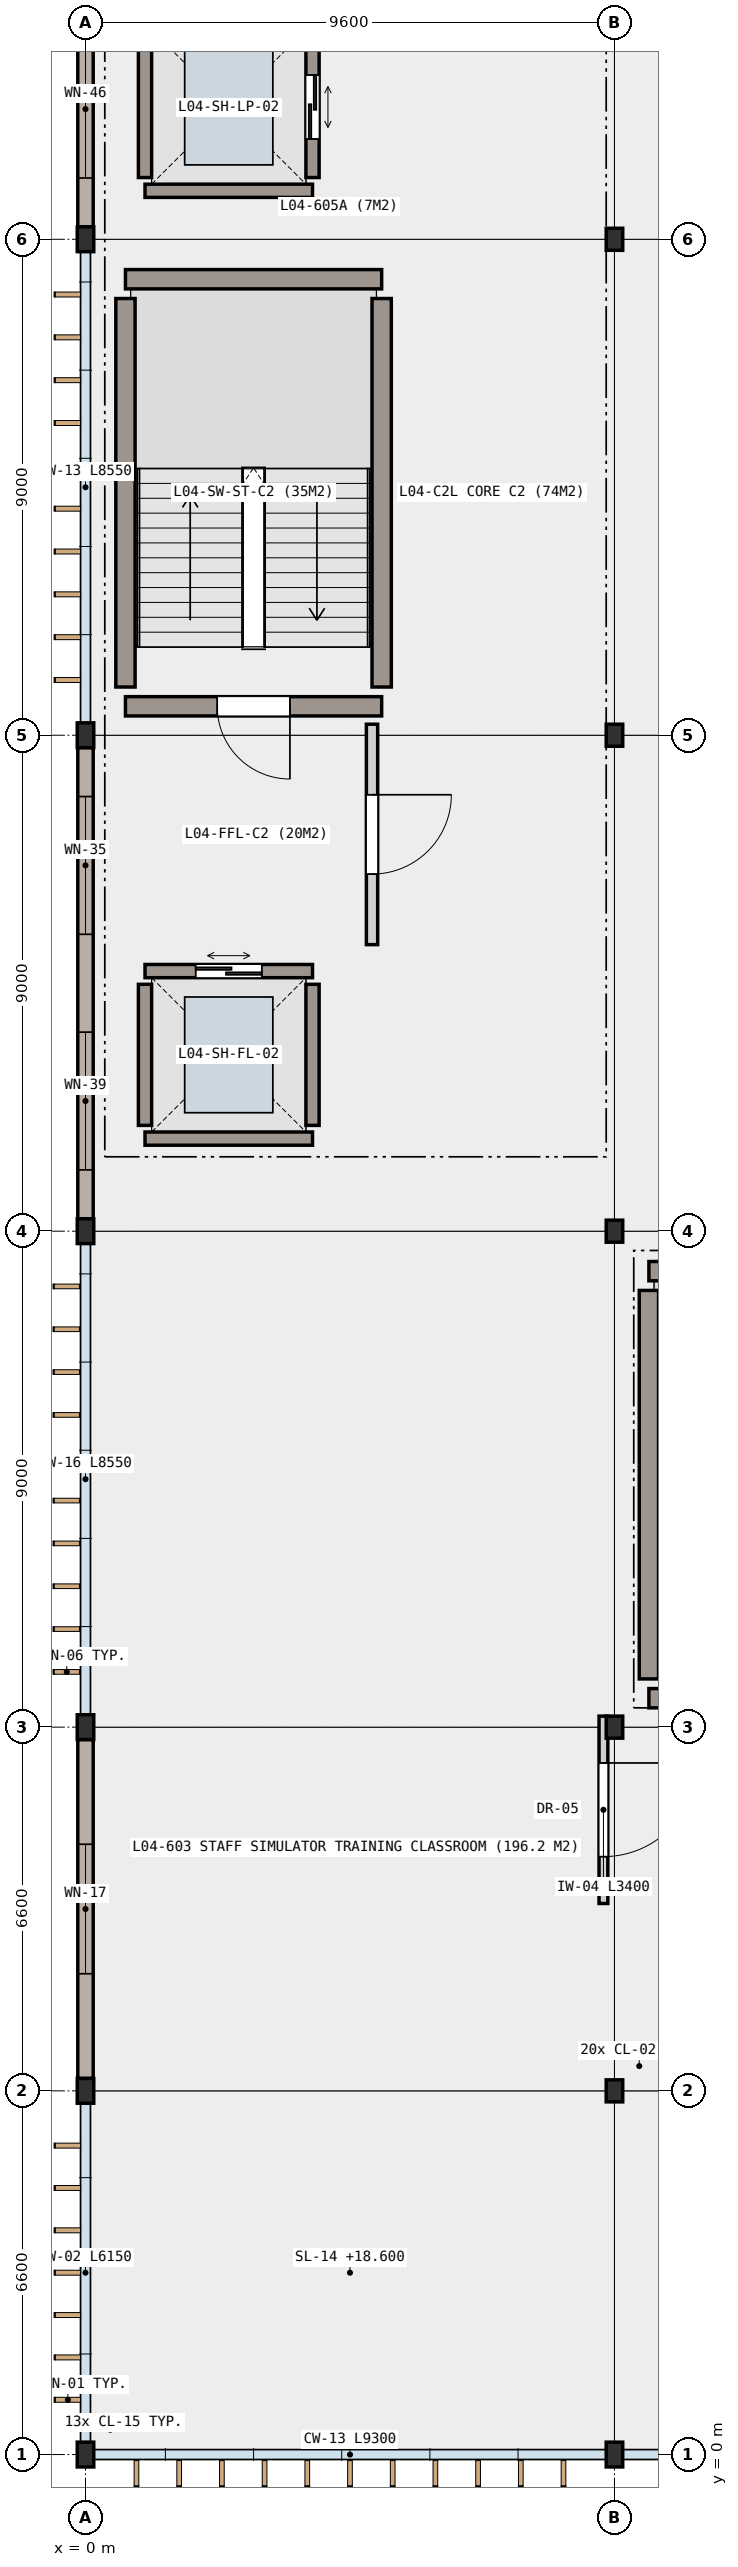
"""IFC4 building model, lengths in metres.
Left out: names, types, materials, properties, quantities, classifications, styles, units other than length and angle.
Written with IfcOpenShell. Run it as: python <this file> out.ifc"""

import sys

from ifc_helpers import new_model, si_unit, direction, frame, frame_2d, origin, origin_2d, place, context, subcontext, project, spatial, rectangle, i_section, extrude, element, fill, save


model = new_model("IFC4")
c1 = context("Model", 3, precision=1e-05, world=origin(), true_north=direction((0.0, 1.0)))
c2 = subcontext(c1, "Body", "Model", "MODEL_VIEW")
j1 = project(units=[si_unit("LENGTHUNIT", "METRE"), si_unit("PLANEANGLEUNIT", "RADIAN")], contexts=[c1])
p1 = place(None, origin())
s1 = spatial("IfcSite", under=j1, at=p1, CompositionType="ELEMENT")
p2 = place(p1, origin())
s2 = spatial("IfcBuilding", under=s1, at=p2, CompositionType="ELEMENT")
p3 = place(p2, frame((0.0, 0.0, 18.6)))
s3 = spatial("IfcBuildingStorey", under=s2, at=p3, CompositionType="ELEMENT", Elevation=18.6)
for number, where, z_axis, x_axis in (
    (1, (0.0, 0.0, 0.0), (0.0, 0.0, 1.0), (1.0, 0.0, 0.0)),
    (2, (0.0, 6.6, 0.0), (0.0, 0.0, 1.0), (1.0, 0.0, 0.0)),
    (3, (0.0, 13.2, 0.0), (0.0, 0.0, 1.0), (1.0, 0.0, 0.0)),
    (4, (0.0, 22.2, 0.0), (0.0, 0.0, 1.0), (1.0, 0.0, 0.0)),
    (5, (0.0, 31.2, 0.0), (0.0, 0.0, 1.0), (1.0, 0.0, 0.0)),
    (6, (0.0, 40.2, 0.0), (0.0, 0.0, 1.0), (1.0, 0.0, 0.0)),
    (7, (9.6, 0.0, 0.0), (0.0, 0.0, 1.0), (1.0, 0.0, 0.0)),
):
    element("IfcColumn", number, at=place(p3, frame(where, z_axis=z_axis, x_axis=x_axis)), inside=s3, PredefinedType="COLUMN", context=c2, shape_type="SweptSolid", body=[
        extrude(i_section(OverallWidth=0.3, OverallDepth=0.45, WebThickness=0.014, FlangeThickness=0.026, FilletRadius=0.027, at=origin_2d()), origin(), (0.0, 0.0, 1.0), 4.2),
    ])
for number, where, z_axis, x_axis in (
    (8, (9.6, 6.6, 0.0), (0.0, 0.0, 1.0), (1.0, 0.0, 0.0)),
    (9, (9.6, 13.2, 0.0), (0.0, 0.0, 1.0), (1.0, 0.0, 0.0)),
    (10, (9.6, 22.2, 0.0), (0.0, 0.0, 1.0), (1.0, 0.0, 0.0)),
    (11, (9.6, 31.2, 0.0), (0.0, 0.0, 1.0), (1.0, 0.0, 0.0)),
    (12, (9.6, 40.2, 0.0), (0.0, 0.0, 1.0), (1.0, 0.0, 0.0)),
):
    element("IfcColumn", number, at=place(p3, frame(where, z_axis=z_axis, x_axis=x_axis)), inside=s3, PredefinedType="COLUMN", context=c2, shape_type="SweptSolid", body=[
        extrude(i_section(OverallWidth=0.3, OverallDepth=0.4, WebThickness=0.013, FlangeThickness=0.024, FilletRadius=0.027, at=origin_2d()), origin(), (0.0, 0.0, 1.0), 4.2),
    ])
p4 = place(p3, frame((0.0, 6.825, 0.0), z_axis=(0.0, 0.0, 1.0), x_axis=(0.0, 1.0, 0.0)))
e13 = element("IfcWall", 13, at=p4, inside=s3, PredefinedType="SOLIDWALL", context=c2, shape_type="SweptSolid", body=[
    extrude(rectangle(XDim=6.15, YDim=0.28, at=frame_2d((3.075, 0.0))), origin(), (0.0, 0.0, 1.0), 3.53),
])
p5 = place(p4, frame((1.9, 0.0, 0.85)))
e14 = element("IfcOpeningElement", 14, at=p5, cuts=e13, PredefinedType="OPENING", context=c2, shape_type="SweptSolid", body=[
    extrude(rectangle(XDim=2.35, YDim=2.15, at=frame_2d((1.175, 1.075))), frame((0.0, 0.15, 0.0), z_axis=(0.0, -1.0, 0.0), x_axis=(1.0, 0.0, 0.0)), (0.0, 0.0, 1.0), 0.3),
])
p6 = place(p3, frame((0.0, 22.425, 0.0), z_axis=(0.0, 0.0, 1.0), x_axis=(0.0, 1.0, 0.0)))
e15 = element("IfcWall", 15, at=p6, inside=s3, PredefinedType="SOLIDWALL", context=c2, shape_type="SweptSolid", body=[
    extrude(rectangle(XDim=8.55, YDim=0.28, at=frame_2d((4.275, 0.0))), origin(), (0.0, 0.0, 1.0), 3.53),
])
p7 = place(p6, frame((0.887, 0.0, 0.85)))
e16 = element("IfcOpeningElement", 16, at=p7, cuts=e15, PredefinedType="OPENING", context=c2, shape_type="SweptSolid", body=[
    extrude(rectangle(XDim=2.5, YDim=1.5, at=frame_2d((1.25, 0.75))), frame((0.0, 0.15, 0.0), z_axis=(0.0, -1.0, 0.0), x_axis=(1.0, 0.0, 0.0)), (0.0, 0.0, 1.0), 0.3),
])
p8 = place(p6, frame((5.163, 0.0, 0.85)))
e17 = element("IfcOpeningElement", 17, at=p8, cuts=e15, PredefinedType="OPENING", context=c2, shape_type="SweptSolid", body=[
    extrude(rectangle(XDim=2.5, YDim=1.85, at=frame_2d((1.25, 0.925))), frame((0.0, 0.15, 0.0), z_axis=(0.0, -1.0, 0.0), x_axis=(1.0, 0.0, 0.0)), (0.0, 0.0, 1.0), 0.3),
])
p9 = place(p3, frame((0.0, 40.425, 0.0), z_axis=(0.0, 0.0, 1.0), x_axis=(0.0, 1.0, 0.0)))
e18 = element("IfcWall", 18, at=p9, inside=s3, PredefinedType="SOLIDWALL", context=c2, shape_type="SweptSolid", body=[
    extrude(rectangle(XDim=8.55, YDim=0.28, at=frame_2d((4.275, 0.0))), origin(), (0.0, 0.0, 1.0), 3.53),
])
p10 = place(p9, frame((0.887, 0.0, 0.85)))
e19 = element("IfcOpeningElement", 19, at=p10, cuts=e18, PredefinedType="OPENING", context=c2, shape_type="SweptSolid", body=[
    extrude(rectangle(XDim=2.5, YDim=2.15, at=frame_2d((1.25, 1.075))), frame((0.0, 0.15, 0.0), z_axis=(0.0, -1.0, 0.0), x_axis=(1.0, 0.0, 0.0)), (0.0, 0.0, 1.0), 0.3),
])
p11 = place(p9, frame((5.087, 0.0, 0.85)))
e20 = element("IfcOpeningElement", 20, at=p11, cuts=e18, PredefinedType="OPENING", context=c2, shape_type="SweptSolid", body=[
    extrude(rectangle(XDim=2.65, YDim=1.5, at=frame_2d((1.325, 0.75))), frame((0.0, 0.15, 0.0), z_axis=(0.0, -1.0, 0.0), x_axis=(1.0, 0.0, 0.0)), (0.0, 0.0, 1.0), 0.3),
])
p12 = place(p3, frame((4.12, 23.88, 0.0), z_axis=(0.0, 0.0, 1.0), x_axis=(-1.0, 0.0, 0.0)))
e21 = element("IfcWall", 21, at=p12, inside=s3, PredefinedType="SHEAR", context=c2, shape_type="SweptSolid", body=[
    extrude(rectangle(XDim=3.04, YDim=0.24, at=frame_2d((1.52, 0.0))), origin(), (0.0, 0.0, 1.0), 3.96),
])
p13 = place(p3, frame((1.08, 26.92, 0.0), z_axis=(0.0, 0.0, 1.0), x_axis=(1.0, 0.0, 0.0)))
e22 = element("IfcWall", 22, at=p13, inside=s3, PredefinedType="SHEAR", context=c2, shape_type="SweptSolid", body=[
    extrude(rectangle(XDim=3.04, YDim=0.24, at=frame_2d((1.52, 0.0))), origin(), (0.0, 0.0, 1.0), 3.96),
])
p14 = place(p13, frame((0.92, 0.0, 0.0)))
e23 = element("IfcOpeningElement", 23, at=p14, cuts=e22, PredefinedType="OPENING", context=c2, shape_type="SweptSolid", body=[
    extrude(rectangle(XDim=1.2, YDim=2.15, at=frame_2d((0.6, 1.075))), frame((0.0, 0.13, 0.0), z_axis=(0.0, -1.0, 0.0), x_axis=(1.0, 0.0, 0.0)), (0.0, 0.0, 1.0), 0.26),
])
for number, where, z_axis, x_axis in (
    (24, (1.08, 24.12, 0.0), (0.0, 0.0, 1.0), (0.0, 1.0, 0.0)),
    (25, (4.12, 26.68, 0.0), (0.0, 0.0, 1.0), (0.0, -1.0, 0.0)),
):
    element("IfcWall", number, at=place(p3, frame(where, z_axis=z_axis, x_axis=x_axis)), inside=s3, PredefinedType="SHEAR", context=c2, shape_type="SweptSolid", body=[
        extrude(rectangle(XDim=2.56, YDim=0.24, at=frame_2d((1.28, 0.0))), origin(), (0.0, 0.0, 1.0), 3.96),
    ])
p15 = place(p3, frame((4.12, 41.08, 0.0), z_axis=(0.0, 0.0, 1.0), x_axis=(-1.0, 0.0, 0.0)))
e26 = element("IfcWall", 26, at=p15, inside=s3, PredefinedType="SHEAR", context=c2, shape_type="SweptSolid", body=[
    extrude(rectangle(XDim=3.04, YDim=0.24, at=frame_2d((1.52, 0.0))), origin(), (0.0, 0.0, 1.0), 3.96),
])
p16 = place(p3, frame((1.08, 41.32, 0.0), z_axis=(0.0, 0.0, 1.0), x_axis=(0.0, 1.0, 0.0)))
e27 = element("IfcWall", 27, at=p16, inside=s3, PredefinedType="SHEAR", context=c2, shape_type="SweptSolid", body=[
    extrude(rectangle(XDim=2.56, YDim=0.24, at=frame_2d((1.28, 0.0))), origin(), (0.0, 0.0, 1.0), 3.96),
])
p17 = place(p3, frame((4.12, 43.88, 0.0), z_axis=(0.0, 0.0, 1.0), x_axis=(0.0, -1.0, 0.0)))
e28 = element("IfcWall", 28, at=p17, inside=s3, PredefinedType="SHEAR", context=c2, shape_type="SweptSolid", body=[
    extrude(rectangle(XDim=2.56, YDim=0.24, at=frame_2d((1.28, 0.0))), origin(), (0.0, 0.0, 1.0), 3.96),
])
p18 = place(p17, frame((0.7, 0.0, 0.0)))
e29 = element("IfcOpeningElement", 29, at=p18, cuts=e28, PredefinedType="OPENING", context=c2, shape_type="SweptSolid", body=[
    extrude(rectangle(XDim=1.16, YDim=2.15, at=frame_2d((0.58, 1.075))), frame((0.0, 0.13, 0.0), z_axis=(0.0, -1.0, 0.0), x_axis=(1.0, 0.0, 0.0)), (0.0, 0.0, 1.0), 0.26),
])
p19 = place(p3, frame((14.875, 13.725, 0.0), z_axis=(0.0, 0.0, 1.0), x_axis=(-1.0, 0.0, 0.0)))
e30 = element("IfcWall", 30, at=p19, inside=s3, PredefinedType="SHEAR", context=c2, shape_type="SweptSolid", body=[
    extrude(rectangle(XDim=4.65, YDim=0.35, at=frame_2d((2.325, 0.0))), origin(), (0.0, 0.0, 1.0), 3.96),
])
p20 = place(p19, frame((1.665, 0.0, 0.0)))
e31 = element("IfcOpeningElement", 31, at=p20, cuts=e30, PredefinedType="OPENING", context=c2, shape_type="SweptSolid", body=[
    extrude(rectangle(XDim=1.32, YDim=2.15, at=frame_2d((0.66, 1.075))), frame((0.0, 0.185, 0.0), z_axis=(0.0, -1.0, 0.0), x_axis=(1.0, 0.0, 0.0)), (0.0, 0.0, 1.0), 0.37),
])
p21 = place(p3, frame((10.225, 21.475, 0.0), z_axis=(0.0, 0.0, 1.0), x_axis=(1.0, 0.0, 0.0)))
e32 = element("IfcWall", 32, at=p21, inside=s3, PredefinedType="SHEAR", context=c2, shape_type="SweptSolid", body=[
    extrude(rectangle(XDim=4.825, YDim=0.35, at=frame_2d((2.413, 0.0))), origin(), (0.0, 0.0, 1.0), 3.96),
])
p22 = place(p3, frame((10.225, 14.075, 0.0), z_axis=(0.0, 0.0, 1.0), x_axis=(0.0, 1.0, 0.0)))
e33 = element("IfcWall", 33, at=p22, inside=s3, PredefinedType="SHEAR", context=c2, shape_type="SweptSolid", body=[
    extrude(rectangle(XDim=7.05, YDim=0.35, at=frame_2d((3.525, 0.0))), origin(), (0.0, 0.0, 1.0), 3.96),
])
p23 = place(p3, frame((5.375, 31.725, 0.0), z_axis=(0.0, 0.0, 1.0), x_axis=(-1.0, 0.0, 0.0)))
e34 = element("IfcWall", 34, at=p23, inside=s3, PredefinedType="SHEAR", context=c2, shape_type="SweptSolid", body=[
    extrude(rectangle(XDim=4.65, YDim=0.35, at=frame_2d((2.325, 0.0))), origin(), (0.0, 0.0, 1.0), 3.96),
])
p24 = place(p23, frame((1.665, 0.0, 0.0)))
e35 = element("IfcOpeningElement", 35, at=p24, cuts=e34, PredefinedType="OPENING", context=c2, shape_type="SweptSolid", body=[
    extrude(rectangle(XDim=1.32, YDim=2.15, at=frame_2d((0.66, 1.075))), frame((0.0, 0.185, 0.0), z_axis=(0.0, -1.0, 0.0), x_axis=(1.0, 0.0, 0.0)), (0.0, 0.0, 1.0), 0.37),
])
p25 = place(p3, frame((0.725, 39.475, 0.0), z_axis=(0.0, 0.0, 1.0), x_axis=(1.0, 0.0, 0.0)))
e36 = element("IfcWall", 36, at=p25, inside=s3, PredefinedType="SHEAR", context=c2, shape_type="SweptSolid", body=[
    extrude(rectangle(XDim=4.65, YDim=0.35, at=frame_2d((2.325, 0.0))), origin(), (0.0, 0.0, 1.0), 3.96),
])
for number, where, z_axis, x_axis in (
    (37, (0.725, 32.075, 0.0), (0.0, 0.0, 1.0), (0.0, 1.0, 0.0)),
    (38, (5.375, 39.125, 0.0), (0.0, 0.0, 1.0), (0.0, -1.0, 0.0)),
):
    element("IfcWall", number, at=place(p3, frame(where, z_axis=z_axis, x_axis=x_axis)), inside=s3, PredefinedType="SHEAR", context=c2, shape_type="SweptSolid", body=[
        extrude(rectangle(XDim=7.05, YDim=0.35, at=frame_2d((3.525, 0.0))), origin(), (0.0, 0.0, 1.0), 3.96),
    ])
p26 = place(p3, frame((5.2, 31.4, 0.0), z_axis=(0.0, 0.0, 1.0), x_axis=(0.0, -1.0, 0.0)))
e39 = element("IfcWall", 39, at=p26, inside=s3, PredefinedType="PARTITIONING", context=c2, shape_type="SweptSolid", body=[
    extrude(rectangle(XDim=4.0, YDim=0.205, at=frame_2d((2.0, 0.0))), origin(), (0.0, 0.0, 1.0), 3.96),
])
p27 = place(p26, frame((1.28, 0.0, 0.0)))
e40 = element("IfcOpeningElement", 40, at=p27, cuts=e39, PredefinedType="OPENING", context=c2, shape_type="SweptSolid", body=[
    extrude(rectangle(XDim=1.44, YDim=2.18, at=frame_2d((0.72, 1.09))), frame((0.0, 0.113, 0.0), z_axis=(0.0, -1.0, 0.0), x_axis=(1.0, 0.0, 0.0)), (0.0, 0.0, 1.0), 0.225),
])
p28 = place(p3, frame((9.4, 13.4, 0.0), z_axis=(0.0, 0.0, 1.0), x_axis=(0.0, -1.0, 0.0)))
e41 = element("IfcWall", 41, at=p28, inside=s3, PredefinedType="PARTITIONING", context=c2, shape_type="SweptSolid", body=[
    extrude(rectangle(XDim=3.4, YDim=0.16, at=frame_2d((1.7, 0.0))), origin(), (0.0, 0.0, 1.0), 3.43),
])
p29 = place(p28, frame((0.85, 0.0, 0.0)))
e42 = element("IfcOpeningElement", 42, at=p29, cuts=e41, PredefinedType="OPENING", context=c2, shape_type="SweptSolid", body=[
    extrude(rectangle(XDim=1.7, YDim=2.22, at=frame_2d((0.85, 1.11))), frame((0.0, 0.09, 0.0), z_axis=(0.0, -1.0, 0.0), x_axis=(1.0, 0.0, 0.0)), (0.0, 0.0, 1.0), 0.18),
])
p30 = place(p5, origin())
e43 = element("IfcWindow", 43, at=p30, inside=s3, PartitioningType="SINGLE_PANEL", PredefinedType="WINDOW", context=c2, shape_type="SweptSolid", body=[
    extrude(rectangle(XDim=2.35, YDim=2.15, at=frame_2d((1.175, 1.075))), frame((0.0, 0.03, 0.0), z_axis=(0.0, -1.0, 0.0), x_axis=(1.0, 0.0, 0.0)), (0.0, 0.0, 1.0), 0.06),
])
fill(e14, e43)
p31 = place(p7, origin())
e44 = element("IfcWindow", 44, at=p31, inside=s3, PartitioningType="SINGLE_PANEL", PredefinedType="WINDOW", context=c2, shape_type="SweptSolid", body=[
    extrude(rectangle(XDim=2.5, YDim=1.5, at=frame_2d((1.25, 0.75))), frame((0.0, 0.03, 0.0), z_axis=(0.0, -1.0, 0.0), x_axis=(1.0, 0.0, 0.0)), (0.0, 0.0, 1.0), 0.06),
])
fill(e16, e44)
p32 = place(p8, origin())
e45 = element("IfcWindow", 45, at=p32, inside=s3, PartitioningType="SINGLE_PANEL", PredefinedType="WINDOW", context=c2, shape_type="SweptSolid", body=[
    extrude(rectangle(XDim=2.5, YDim=1.85, at=frame_2d((1.25, 0.925))), frame((0.0, 0.03, 0.0), z_axis=(0.0, -1.0, 0.0), x_axis=(1.0, 0.0, 0.0)), (0.0, 0.0, 1.0), 0.06),
])
fill(e17, e45)
p33 = place(p10, origin())
e46 = element("IfcWindow", 46, at=p33, inside=s3, PartitioningType="SINGLE_PANEL", PredefinedType="WINDOW", context=c2, shape_type="SweptSolid", body=[
    extrude(rectangle(XDim=2.5, YDim=2.15, at=frame_2d((1.25, 1.075))), frame((0.0, 0.03, 0.0), z_axis=(0.0, -1.0, 0.0), x_axis=(1.0, 0.0, 0.0)), (0.0, 0.0, 1.0), 0.06),
])
fill(e19, e46)
p34 = place(p14, origin())
e47 = element("IfcDoor", 47, at=p34, inside=s3, OperationType="DOUBLE_DOOR_SLIDING", PredefinedType="DOOR", context=c2, shape_type="SweptSolid", body=[
    extrude(rectangle(XDim=1.2, YDim=2.15, at=frame_2d((0.6, 1.075))), frame((0.0, 0.025, 0.0), z_axis=(0.0, -1.0, 0.0), x_axis=(1.0, 0.0, 0.0)), (0.0, 0.0, 1.0), 0.05),
])
fill(e23, e47)
p35 = place(p18, origin())
e48 = element("IfcDoor", 48, at=p35, inside=s3, OperationType="DOUBLE_DOOR_SLIDING", PredefinedType="DOOR", context=c2, shape_type="SweptSolid", body=[
    extrude(rectangle(XDim=1.16, YDim=2.15, at=frame_2d((0.58, 1.075))), frame((0.0, 0.025, 0.0), z_axis=(0.0, -1.0, 0.0), x_axis=(1.0, 0.0, 0.0)), (0.0, 0.0, 1.0), 0.05),
])
fill(e29, e48)
p36 = place(p24, origin())
e49 = element("IfcDoor", 49, at=p36, inside=s3, OperationType="SINGLE_SWING_LEFT", PredefinedType="DOOR", context=c2, shape_type="SweptSolid", body=[
    extrude(rectangle(XDim=1.32, YDim=2.15, at=frame_2d((0.66, 1.075))), frame((0.0, 0.025, 0.0), z_axis=(0.0, -1.0, 0.0), x_axis=(1.0, 0.0, 0.0)), (0.0, 0.0, 1.0), 0.05),
])
fill(e35, e49)
p37 = place(p27, origin())
e50 = element("IfcDoor", 50, at=p37, inside=s3, OperationType="SINGLE_SWING_LEFT", PredefinedType="DOOR", context=c2, shape_type="SweptSolid", body=[
    extrude(rectangle(XDim=1.44, YDim=2.18, at=frame_2d((0.72, 1.09))), frame((0.0, 0.025, 0.0), z_axis=(0.0, -1.0, 0.0), x_axis=(1.0, 0.0, 0.0)), (0.0, 0.0, 1.0), 0.05),
])
fill(e40, e50)
p38 = place(p29, origin())
e51 = element("IfcDoor", 51, at=p38, inside=s3, OperationType="SINGLE_SWING_LEFT", PredefinedType="DOOR", context=c2, shape_type="SweptSolid", body=[
    extrude(rectangle(XDim=1.7, YDim=2.22, at=frame_2d((0.85, 1.11))), frame((0.0, 0.025, 0.0), z_axis=(0.0, -1.0, 0.0), x_axis=(1.0, 0.0, 0.0)), (0.0, 0.0, 1.0), 0.05),
])
fill(e42, e51)
save(model, sys.argv[1])
